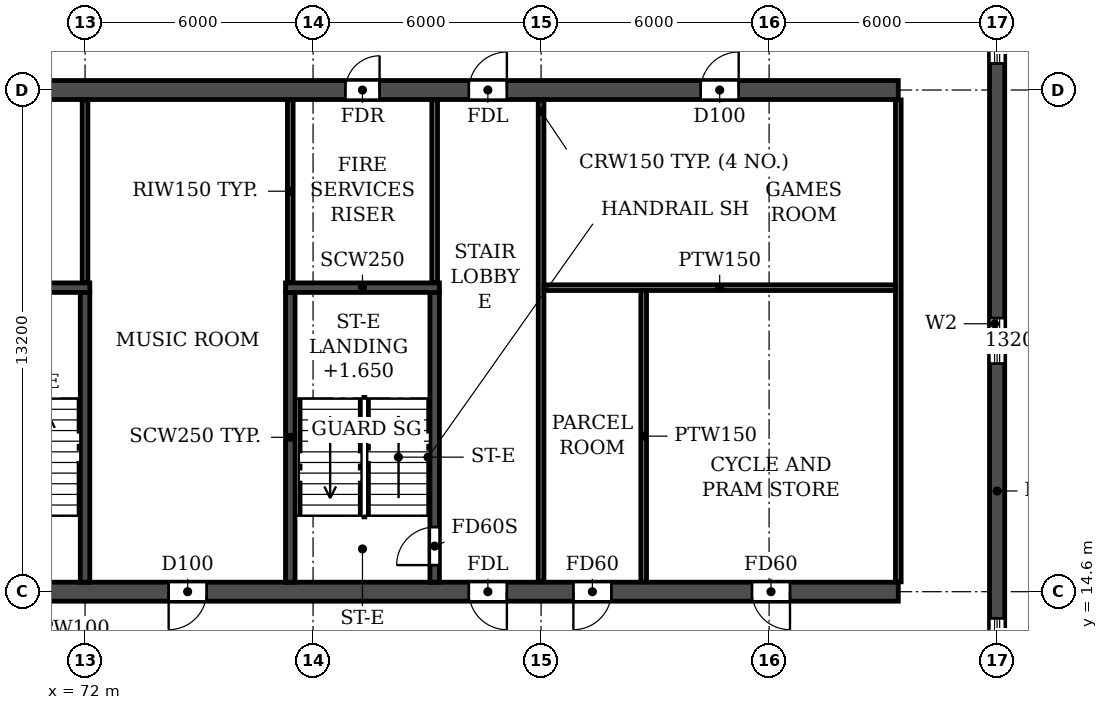
"""IFC4 building model, lengths in metres.
Left out: names, types, materials, properties, quantities, classifications, styles, units other than length and angle.
Written with IfcOpenShell. Run it as: python <this file> out.ifc"""

import sys

from ifc_helpers import new_model, si_unit, direction, frame, frame_2d, origin, place, context, subcontext, project, spatial, rectangle, extrude, element, fill, save


model = new_model("IFC4")
c1 = context("Model", 3, precision=1e-05, world=origin(), true_north=direction((0.0, 1.0)))
c2 = subcontext(c1, "Body", "Model", "MODEL_VIEW")
j1 = project(units=[si_unit("LENGTHUNIT", "METRE"), si_unit("PLANEANGLEUNIT", "RADIAN")], contexts=[c1])
p1 = place(None, origin())
s1 = spatial("IfcSite", under=j1, at=p1, CompositionType="ELEMENT")
p2 = place(p1, origin())
s2 = spatial("IfcBuilding", under=s1, at=p2, CompositionType="ELEMENT")
p3 = place(p2, frame((0.0, 0.0, 92.7)))
s3 = spatial("IfcBuildingStorey", under=s2, at=p3, CompositionType="ELEMENT", Elevation=92.7)
p4 = place(p3, frame((96.0, 4.683, 0.0), z_axis=(0.0, 0.0, 1.0), x_axis=(0.0, 1.0, 0.0)))
e1 = element("IfcWall", 1, at=p4, inside=s3, PredefinedType="SHEAR", context=c2, shape_type="SweptSolid", body=[
    extrude(rectangle(XDim=34.234, YDim=0.4, at=frame_2d((17.117, 0.0))), origin(), (0.0, 0.0, 1.0), 3.06),
])
p5 = place(p4, frame((15.917, 0.0, 0.9)))
e2 = element("IfcOpeningElement", 2, at=p5, cuts=e1, PredefinedType="OPENING", context=c2, shape_type="SweptSolid", body=[
    extrude(rectangle(XDim=1.2, YDim=1.5, at=frame_2d((0.6, 0.75))), frame((0.0, 0.21, 0.0), z_axis=(0.0, -1.0, 0.0), x_axis=(1.0, 0.0, 0.0)), (0.0, 0.0, 1.0), 0.42),
])
p6 = place(p4, frame((23.817, 0.0, 0.9)))
e3 = element("IfcOpeningElement", 3, at=p6, cuts=e1, PredefinedType="OPENING", context=c2, shape_type="SweptSolid", body=[
    extrude(rectangle(XDim=1.2, YDim=1.5, at=frame_2d((0.6, 0.75))), frame((0.0, 0.21, 0.0), z_axis=(0.0, -1.0, 0.0), x_axis=(1.0, 0.0, 0.0)), (0.0, 0.0, 1.0), 0.42),
])
p7 = place(p4, frame((8.017, 0.0, 0.9)))
e4 = element("IfcOpeningElement", 4, at=p7, cuts=e1, PredefinedType="OPENING", context=c2, shape_type="SweptSolid", body=[
    extrude(rectangle(XDim=1.2, YDim=1.5, at=frame_2d((0.6, 0.75))), frame((0.0, 0.21, 0.0), z_axis=(0.0, -1.0, 0.0), x_axis=(1.0, 0.0, 0.0)), (0.0, 0.0, 1.0), 0.42),
])
p8 = place(p4, frame((28.894, 0.0, 0.6)))
e5 = element("IfcOpeningElement", 5, at=p8, cuts=e1, PredefinedType="OPENING", context=c2, shape_type="SweptSolid", body=[
    extrude(rectangle(XDim=2.2, YDim=1.8, at=frame_2d((1.1, 0.9))), frame((0.0, 0.21, 0.0), z_axis=(0.0, -1.0, 0.0), x_axis=(1.0, 0.0, 0.0)), (0.0, 0.0, 1.0), 0.42),
])
p9 = place(p4, frame((2.541, 0.0, 0.6)))
e6 = element("IfcOpeningElement", 6, at=p9, cuts=e1, PredefinedType="OPENING", context=c2, shape_type="SweptSolid", body=[
    extrude(rectangle(XDim=2.2, YDim=1.8, at=frame_2d((1.1, 0.9))), frame((0.0, 0.21, 0.0), z_axis=(0.0, -1.0, 0.0), x_axis=(1.0, 0.0, 0.0)), (0.0, 0.0, 1.0), 0.42),
])
p10 = place(p3, frame((8.6, 14.6, 0.0), z_axis=(0.0, 0.0, 1.0), x_axis=(1.0, 0.0, 0.0)))
e7 = element("IfcWall", 7, at=p10, inside=s3, PredefinedType="SOLIDWALL", context=c2, shape_type="SweptSolid", body=[
    extrude(rectangle(XDim=84.8, YDim=0.5, at=frame_2d((42.4, 0.0))), origin(), (0.0, 0.0, 1.0), 3.06),
])
p11 = place(p10, frame((4.2, 0.0, 0.0)))
e8 = element("IfcOpeningElement", 8, at=p11, cuts=e7, PredefinedType="OPENING", context=c2, shape_type="SweptSolid", body=[
    extrude(rectangle(XDim=1.0, YDim=2.1, at=frame_2d((0.5, 1.05))), frame((0.0, 0.26, 0.0), z_axis=(0.0, -1.0, 0.0), x_axis=(1.0, 0.0, 0.0)), (0.0, 0.0, 1.0), 0.52),
])
p12 = place(p10, frame((10.3, 0.0, 0.0)))
e9 = element("IfcOpeningElement", 9, at=p12, cuts=e7, PredefinedType="OPENING", context=c2, shape_type="SweptSolid", body=[
    extrude(rectangle(XDim=1.0, YDim=2.1, at=frame_2d((0.5, 1.05))), frame((0.0, 0.26, 0.0), z_axis=(0.0, -1.0, 0.0), x_axis=(1.0, 0.0, 0.0)), (0.0, 0.0, 1.0), 0.52),
])
p13 = place(p10, frame((18.2, 0.0, 0.0)))
e10 = element("IfcOpeningElement", 10, at=p13, cuts=e7, PredefinedType="OPENING", context=c2, shape_type="SweptSolid", body=[
    extrude(rectangle(XDim=1.0, YDim=2.1, at=frame_2d((0.5, 1.05))), frame((0.0, 0.26, 0.0), z_axis=(0.0, -1.0, 0.0), x_axis=(1.0, 0.0, 0.0)), (0.0, 0.0, 1.0), 0.52),
])
p14 = place(p10, frame((22.8, 0.0, 0.0)))
e11 = element("IfcOpeningElement", 11, at=p14, cuts=e7, PredefinedType="OPENING", context=c2, shape_type="SweptSolid", body=[
    extrude(rectangle(XDim=1.0, YDim=2.1, at=frame_2d((0.5, 1.05))), frame((0.0, 0.26, 0.0), z_axis=(0.0, -1.0, 0.0), x_axis=(1.0, 0.0, 0.0)), (0.0, 0.0, 1.0), 0.52),
])
p15 = place(p10, frame((34.1, 0.0, 0.0)))
e12 = element("IfcOpeningElement", 12, at=p15, cuts=e7, PredefinedType="OPENING", context=c2, shape_type="SweptSolid", body=[
    extrude(rectangle(XDim=1.0, YDim=2.1, at=frame_2d((0.5, 1.05))), frame((0.0, 0.26, 0.0), z_axis=(0.0, -1.0, 0.0), x_axis=(1.0, 0.0, 0.0)), (0.0, 0.0, 1.0), 0.52),
])
p16 = place(p10, frame((38.0, 0.0, 0.0)))
e13 = element("IfcOpeningElement", 13, at=p16, cuts=e7, PredefinedType="OPENING", context=c2, shape_type="SweptSolid", body=[
    extrude(rectangle(XDim=1.0, YDim=2.1, at=frame_2d((0.5, 1.05))), frame((0.0, 0.26, 0.0), z_axis=(0.0, -1.0, 0.0), x_axis=(1.0, 0.0, 0.0)), (0.0, 0.0, 1.0), 0.52),
])
p17 = place(p10, frame((41.9, 0.0, 0.0)))
e14 = element("IfcOpeningElement", 14, at=p17, cuts=e7, PredefinedType="OPENING", context=c2, shape_type="SweptSolid", body=[
    extrude(rectangle(XDim=1.0, YDim=2.1, at=frame_2d((0.5, 1.05))), frame((0.0, 0.26, 0.0), z_axis=(0.0, -1.0, 0.0), x_axis=(1.0, 0.0, 0.0)), (0.0, 0.0, 1.0), 0.52),
])
p18 = place(p10, frame((47.1, 0.0, 0.0)))
e15 = element("IfcOpeningElement", 15, at=p18, cuts=e7, PredefinedType="OPENING", context=c2, shape_type="SweptSolid", body=[
    extrude(rectangle(XDim=1.0, YDim=2.1, at=frame_2d((0.5, 1.05))), frame((0.0, 0.26, 0.0), z_axis=(0.0, -1.0, 0.0), x_axis=(1.0, 0.0, 0.0)), (0.0, 0.0, 1.0), 0.52),
])
p19 = place(p10, frame((61.0, 0.0, 0.0)))
e16 = element("IfcOpeningElement", 16, at=p19, cuts=e7, PredefinedType="OPENING", context=c2, shape_type="SweptSolid", body=[
    extrude(rectangle(XDim=1.0, YDim=2.1, at=frame_2d((0.5, 1.05))), frame((0.0, 0.26, 0.0), z_axis=(0.0, -1.0, 0.0), x_axis=(1.0, 0.0, 0.0)), (0.0, 0.0, 1.0), 0.52),
])
p20 = place(p10, frame((65.6, 0.0, 0.0)))
e17 = element("IfcOpeningElement", 17, at=p20, cuts=e7, PredefinedType="OPENING", context=c2, shape_type="SweptSolid", body=[
    extrude(rectangle(XDim=1.0, YDim=2.1, at=frame_2d((0.5, 1.05))), frame((0.0, 0.26, 0.0), z_axis=(0.0, -1.0, 0.0), x_axis=(1.0, 0.0, 0.0)), (0.0, 0.0, 1.0), 0.52),
])
p21 = place(p10, frame((73.5, 0.0, 0.0)))
e18 = element("IfcOpeningElement", 18, at=p21, cuts=e7, PredefinedType="OPENING", context=c2, shape_type="SweptSolid", body=[
    extrude(rectangle(XDim=1.0, YDim=2.1, at=frame_2d((0.5, 1.05))), frame((0.0, 0.26, 0.0), z_axis=(0.0, -1.0, 0.0), x_axis=(1.0, 0.0, 0.0)), (0.0, 0.0, 1.0), 0.52),
])
p22 = place(p10, frame((76.25, 0.0, 0.0)))
e19 = element("IfcOpeningElement", 19, at=p22, cuts=e7, PredefinedType="OPENING", context=c2, shape_type="SweptSolid", body=[
    extrude(rectangle(XDim=1.0, YDim=2.1, at=frame_2d((0.5, 1.05))), frame((0.0, 0.26, 0.0), z_axis=(0.0, -1.0, 0.0), x_axis=(1.0, 0.0, 0.0)), (0.0, 0.0, 1.0), 0.52),
])
p23 = place(p10, frame((80.95, 0.0, 0.0)))
e20 = element("IfcOpeningElement", 20, at=p23, cuts=e7, PredefinedType="OPENING", context=c2, shape_type="SweptSolid", body=[
    extrude(rectangle(XDim=1.0, YDim=2.1, at=frame_2d((0.5, 1.05))), frame((0.0, 0.26, 0.0), z_axis=(0.0, -1.0, 0.0), x_axis=(1.0, 0.0, 0.0)), (0.0, 0.0, 1.0), 0.52),
])
p24 = place(p3, frame((8.6, 27.8, 0.0), z_axis=(0.0, 0.0, 1.0), x_axis=(1.0, 0.0, 0.0)))
e21 = element("IfcWall", 21, at=p24, inside=s3, PredefinedType="SOLIDWALL", context=c2, shape_type="SweptSolid", body=[
    extrude(rectangle(XDim=84.8, YDim=0.5, at=frame_2d((42.4, 0.0))), origin(), (0.0, 0.0, 1.0), 3.06),
])
p25 = place(p24, frame((0.9, 0.0, 0.0)))
e22 = element("IfcOpeningElement", 22, at=p25, cuts=e21, PredefinedType="OPENING", context=c2, shape_type="SweptSolid", body=[
    extrude(rectangle(XDim=1.0, YDim=2.1, at=frame_2d((0.5, 1.05))), frame((0.0, 0.26, 0.0), z_axis=(0.0, -1.0, 0.0), x_axis=(1.0, 0.0, 0.0)), (0.0, 0.0, 1.0), 0.52),
])
p26 = place(p24, frame((5.6, 0.0, 0.0)))
e23 = element("IfcOpeningElement", 23, at=p26, cuts=e21, PredefinedType="OPENING", context=c2, shape_type="SweptSolid", body=[
    extrude(rectangle(XDim=1.0, YDim=2.1, at=frame_2d((0.5, 1.05))), frame((0.0, 0.26, 0.0), z_axis=(0.0, -1.0, 0.0), x_axis=(1.0, 0.0, 0.0)), (0.0, 0.0, 1.0), 0.52),
])
p27 = place(p24, frame((10.3, 0.0, 0.0)))
e24 = element("IfcOpeningElement", 24, at=p27, cuts=e21, PredefinedType="OPENING", context=c2, shape_type="SweptSolid", body=[
    extrude(rectangle(XDim=1.0, YDim=2.1, at=frame_2d((0.5, 1.05))), frame((0.0, 0.26, 0.0), z_axis=(0.0, -1.0, 0.0), x_axis=(1.0, 0.0, 0.0)), (0.0, 0.0, 1.0), 0.52),
])
p28 = place(p24, frame((13.65, 0.0, 0.0)))
e25 = element("IfcOpeningElement", 25, at=p28, cuts=e21, PredefinedType="OPENING", context=c2, shape_type="SweptSolid", body=[
    extrude(rectangle(XDim=0.9, YDim=2.1, at=frame_2d((0.45, 1.05))), frame((0.0, 0.26, 0.0), z_axis=(0.0, -1.0, 0.0), x_axis=(1.0, 0.0, 0.0)), (0.0, 0.0, 1.0), 0.52),
])
p29 = place(p24, frame((22.85, 0.0, 0.0)))
e26 = element("IfcOpeningElement", 26, at=p29, cuts=e21, PredefinedType="OPENING", context=c2, shape_type="SweptSolid", body=[
    extrude(rectangle(XDim=0.9, YDim=2.1, at=frame_2d((0.45, 1.05))), frame((0.0, 0.26, 0.0), z_axis=(0.0, -1.0, 0.0), x_axis=(1.0, 0.0, 0.0)), (0.0, 0.0, 1.0), 0.52),
])
p30 = place(p24, frame((26.0, 0.0, 0.0)))
e27 = element("IfcOpeningElement", 27, at=p30, cuts=e21, PredefinedType="OPENING", context=c2, shape_type="SweptSolid", body=[
    extrude(rectangle(XDim=1.0, YDim=2.1, at=frame_2d((0.5, 1.05))), frame((0.0, 0.26, 0.0), z_axis=(0.0, -1.0, 0.0), x_axis=(1.0, 0.0, 0.0)), (0.0, 0.0, 1.0), 0.52),
])
p31 = place(p24, frame((31.2, 0.0, 0.0)))
e28 = element("IfcOpeningElement", 28, at=p31, cuts=e21, PredefinedType="OPENING", context=c2, shape_type="SweptSolid", body=[
    extrude(rectangle(XDim=1.0, YDim=2.1, at=frame_2d((0.5, 1.05))), frame((0.0, 0.26, 0.0), z_axis=(0.0, -1.0, 0.0), x_axis=(1.0, 0.0, 0.0)), (0.0, 0.0, 1.0), 0.52),
])
p32 = place(p24, frame((39.0, 0.0, 0.0)))
e29 = element("IfcOpeningElement", 29, at=p32, cuts=e21, PredefinedType="OPENING", context=c2, shape_type="SweptSolid", body=[
    extrude(rectangle(XDim=1.0, YDim=2.1, at=frame_2d((0.5, 1.05))), frame((0.0, 0.26, 0.0), z_axis=(0.0, -1.0, 0.0), x_axis=(1.0, 0.0, 0.0)), (0.0, 0.0, 1.0), 0.52),
])
p33 = place(p24, frame((41.9, 0.0, 0.0)))
e30 = element("IfcOpeningElement", 30, at=p33, cuts=e21, PredefinedType="OPENING", context=c2, shape_type="SweptSolid", body=[
    extrude(rectangle(XDim=1.0, YDim=2.1, at=frame_2d((0.5, 1.05))), frame((0.0, 0.26, 0.0), z_axis=(0.0, -1.0, 0.0), x_axis=(1.0, 0.0, 0.0)), (0.0, 0.0, 1.0), 0.52),
])
p34 = place(p24, frame((46.1, 0.0, 0.0)))
e31 = element("IfcOpeningElement", 31, at=p34, cuts=e21, PredefinedType="OPENING", context=c2, shape_type="SweptSolid", body=[
    extrude(rectangle(XDim=1.0, YDim=2.1, at=frame_2d((0.5, 1.05))), frame((0.0, 0.26, 0.0), z_axis=(0.0, -1.0, 0.0), x_axis=(1.0, 0.0, 0.0)), (0.0, 0.0, 1.0), 0.52),
])
p35 = place(p24, frame((50.0, 0.0, 0.0)))
e32 = element("IfcOpeningElement", 32, at=p35, cuts=e21, PredefinedType="OPENING", context=c2, shape_type="SweptSolid", body=[
    extrude(rectangle(XDim=1.0, YDim=2.1, at=frame_2d((0.5, 1.05))), frame((0.0, 0.26, 0.0), z_axis=(0.0, -1.0, 0.0), x_axis=(1.0, 0.0, 0.0)), (0.0, 0.0, 1.0), 0.52),
])
p36 = place(p24, frame((52.6, 0.0, 0.0)))
e33 = element("IfcOpeningElement", 33, at=p36, cuts=e21, PredefinedType="OPENING", context=c2, shape_type="SweptSolid", body=[
    extrude(rectangle(XDim=1.0, YDim=2.1, at=frame_2d((0.5, 1.05))), frame((0.0, 0.26, 0.0), z_axis=(0.0, -1.0, 0.0), x_axis=(1.0, 0.0, 0.0)), (0.0, 0.0, 1.0), 0.52),
])
p37 = place(p24, frame((56.25, 0.0, 0.0)))
e34 = element("IfcOpeningElement", 34, at=p37, cuts=e21, PredefinedType="OPENING", context=c2, shape_type="SweptSolid", body=[
    extrude(rectangle(XDim=1.5, YDim=2.1, at=frame_2d((0.75, 1.05))), frame((0.0, 0.26, 0.0), z_axis=(0.0, -1.0, 0.0), x_axis=(1.0, 0.0, 0.0)), (0.0, 0.0, 1.0), 0.52),
])
p38 = place(p24, frame((61.05, 0.0, 0.0)))
e35 = element("IfcOpeningElement", 35, at=p38, cuts=e21, PredefinedType="OPENING", context=c2, shape_type="SweptSolid", body=[
    extrude(rectangle(XDim=0.9, YDim=2.1, at=frame_2d((0.45, 1.05))), frame((0.0, 0.26, 0.0), z_axis=(0.0, -1.0, 0.0), x_axis=(1.0, 0.0, 0.0)), (0.0, 0.0, 1.0), 0.52),
])
p39 = place(p24, frame((70.25, 0.0, 0.0)))
e36 = element("IfcOpeningElement", 36, at=p39, cuts=e21, PredefinedType="OPENING", context=c2, shape_type="SweptSolid", body=[
    extrude(rectangle(XDim=0.9, YDim=2.1, at=frame_2d((0.45, 1.05))), frame((0.0, 0.26, 0.0), z_axis=(0.0, -1.0, 0.0), x_axis=(1.0, 0.0, 0.0)), (0.0, 0.0, 1.0), 0.52),
])
p40 = place(p24, frame((73.5, 0.0, 0.0)))
e37 = element("IfcOpeningElement", 37, at=p40, cuts=e21, PredefinedType="OPENING", context=c2, shape_type="SweptSolid", body=[
    extrude(rectangle(XDim=1.0, YDim=2.1, at=frame_2d((0.5, 1.05))), frame((0.0, 0.26, 0.0), z_axis=(0.0, -1.0, 0.0), x_axis=(1.0, 0.0, 0.0)), (0.0, 0.0, 1.0), 0.52),
])
p41 = place(p24, frame((79.6, 0.0, 0.0)))
e38 = element("IfcOpeningElement", 38, at=p41, cuts=e21, PredefinedType="OPENING", context=c2, shape_type="SweptSolid", body=[
    extrude(rectangle(XDim=1.0, YDim=2.1, at=frame_2d((0.5, 1.05))), frame((0.0, 0.26, 0.0), z_axis=(0.0, -1.0, 0.0), x_axis=(1.0, 0.0, 0.0)), (0.0, 0.0, 1.0), 0.52),
])
p42 = place(p3, frame((72.0, 14.85, 0.0), z_axis=(0.0, 0.0, 1.0), x_axis=(0.0, 1.0, 0.0)))
e39 = element("IfcWall", 39, at=p42, inside=s3, PredefinedType="SOLIDWALL", context=c2, shape_type="SweptSolid", body=[
    extrude(rectangle(XDim=7.625, YDim=0.25, at=frame_2d((3.812, 0.0))), origin(), (0.0, 0.0, 1.0), 3.06),
])
p43 = place(p3, frame((68.075, 22.6, 0.0), z_axis=(0.0, 0.0, 1.0), x_axis=(1.0, 0.0, 0.0)))
e40 = element("IfcWall", 40, at=p43, inside=s3, PredefinedType="SOLIDWALL", context=c2, shape_type="SweptSolid", body=[
    extrude(rectangle(XDim=4.05, YDim=0.25, at=frame_2d((2.025, 0.0))), origin(), (0.0, 0.0, 1.0), 3.06),
])
p44 = place(p3, frame((77.4, 14.85, 0.0), z_axis=(0.0, 0.0, 1.0), x_axis=(0.0, 1.0, 0.0)))
e41 = element("IfcWall", 41, at=p44, inside=s3, PredefinedType="SOLIDWALL", context=c2, shape_type="SweptSolid", body=[
    extrude(rectangle(XDim=7.625, YDim=0.25, at=frame_2d((3.812, 0.0))), origin(), (0.0, 0.0, 1.0), 3.06),
])
p45 = place(p3, frame((81.2, 14.85, 0.0), z_axis=(0.0, 0.0, 1.0), x_axis=(0.0, 1.0, 0.0)))
e42 = element("IfcWall", 42, at=p45, inside=s3, PredefinedType="SOLIDWALL", context=c2, shape_type="SweptSolid", body=[
    extrude(rectangle(XDim=7.625, YDim=0.25, at=frame_2d((3.812, 0.0))), origin(), (0.0, 0.0, 1.0), 3.06),
])
p46 = place(p45, frame((0.45, 0.0, 0.0)))
e43 = element("IfcOpeningElement", 43, at=p46, cuts=e42, PredefinedType="OPENING", context=c2, shape_type="SweptSolid", body=[
    extrude(rectangle(XDim=1.0, YDim=2.1, at=frame_2d((0.5, 1.05))), frame((0.0, 0.135, 0.0), z_axis=(0.0, -1.0, 0.0), x_axis=(1.0, 0.0, 0.0)), (0.0, 0.0, 1.0), 0.27),
])
p47 = place(p3, frame((77.275, 22.6, 0.0), z_axis=(0.0, 0.0, 1.0), x_axis=(1.0, 0.0, 0.0)))
e44 = element("IfcWall", 44, at=p47, inside=s3, PredefinedType="SOLIDWALL", context=c2, shape_type="SweptSolid", body=[
    extrude(rectangle(XDim=4.05, YDim=0.25, at=frame_2d((2.025, 0.0))), origin(), (0.0, 0.0, 1.0), 3.06),
])
for number, where, z_axis, x_axis in (
    (45, (84.0, 14.86, 0.0), (0.0, 0.0, 1.0), (0.0, 1.0, 0.0)),
    (46, (93.4, 14.86, 0.0), (0.0, 0.0, 1.0), (0.0, 1.0, 0.0)),
):
    element("IfcWall", number, at=place(p3, frame(where, z_axis=z_axis, x_axis=x_axis)), inside=s3, PredefinedType="PARTITIONING", context=c2, shape_type="SweptSolid", body=[
        extrude(rectangle(XDim=12.68, YDim=0.15, at=frame_2d((6.34, 0.0))), origin(), (0.0, 0.0, 1.0), 3.06),
    ])
p48 = place(p3, frame((84.075, 22.6, 0.0), z_axis=(0.0, 0.0, 1.0), x_axis=(1.0, 0.0, 0.0)))
e47 = element("IfcWall", 47, at=p48, inside=s3, PredefinedType="PARTITIONING", context=c2, shape_type="SweptSolid", body=[
    extrude(rectangle(XDim=9.25, YDim=0.15, at=frame_2d((4.625, 0.0))), origin(), (0.0, 0.0, 1.0), 3.06),
])
p49 = place(p3, frame((86.7, 14.86, 0.0), z_axis=(0.0, 0.0, 1.0), x_axis=(0.0, 1.0, 0.0)))
e48 = element("IfcWall", 48, at=p49, inside=s3, PredefinedType="PARTITIONING", context=c2, shape_type="SweptSolid", body=[
    extrude(rectangle(XDim=7.665, YDim=0.15, at=frame_2d((3.833, 0.0))), origin(), (0.0, 0.0, 1.0), 3.06),
])
for number, where, z_axis, x_axis in (
    (49, (72.0, 22.735, 0.0), (0.0, 0.0, 1.0), (0.0, 1.0, 0.0)),
    (50, (77.4, 22.735, 0.0), (0.0, 0.0, 1.0), (0.0, 1.0, 0.0)),
    (51, (81.2, 22.735, 0.0), (0.0, 0.0, 1.0), (0.0, 1.0, 0.0)),
):
    element("IfcWall", number, at=place(p3, frame(where, z_axis=z_axis, x_axis=x_axis)), inside=s3, PredefinedType="PARTITIONING", context=c2, shape_type="SweptSolid", body=[
        extrude(rectangle(XDim=4.805, YDim=0.15, at=frame_2d((2.402, 0.0))), origin(), (0.0, 0.0, 1.0), 3.06),
    ])
p50 = place(p5, origin())
e52 = element("IfcWindow", 52, at=p50, inside=s3, PartitioningType="SINGLE_PANEL", PredefinedType="WINDOW", context=c2, shape_type="SweptSolid", body=[
    extrude(rectangle(XDim=1.2, YDim=1.5, at=frame_2d((0.6, 0.75))), frame((0.0, 0.03, 0.0), z_axis=(0.0, -1.0, 0.0), x_axis=(1.0, 0.0, 0.0)), (0.0, 0.0, 1.0), 0.06),
])
fill(e2, e52)
p51 = place(p6, origin())
e53 = element("IfcWindow", 53, at=p51, inside=s3, PartitioningType="SINGLE_PANEL", PredefinedType="WINDOW", context=c2, shape_type="SweptSolid", body=[
    extrude(rectangle(XDim=1.2, YDim=1.5, at=frame_2d((0.6, 0.75))), frame((0.0, 0.03, 0.0), z_axis=(0.0, -1.0, 0.0), x_axis=(1.0, 0.0, 0.0)), (0.0, 0.0, 1.0), 0.06),
])
fill(e3, e53)
p52 = place(p7, origin())
e54 = element("IfcWindow", 54, at=p52, inside=s3, PartitioningType="SINGLE_PANEL", PredefinedType="WINDOW", context=c2, shape_type="SweptSolid", body=[
    extrude(rectangle(XDim=1.2, YDim=1.5, at=frame_2d((0.6, 0.75))), frame((0.0, 0.03, 0.0), z_axis=(0.0, -1.0, 0.0), x_axis=(1.0, 0.0, 0.0)), (0.0, 0.0, 1.0), 0.06),
])
fill(e4, e54)
p53 = place(p39, origin())
e55 = element("IfcDoor", 55, at=p53, inside=s3, OperationType="SINGLE_SWING_RIGHT", PredefinedType="DOOR", context=c2, shape_type="SweptSolid", body=[
    extrude(rectangle(XDim=0.9, YDim=2.1, at=frame_2d((0.45, 1.05))), frame((0.0, 0.025, 0.0), z_axis=(0.0, -1.0, 0.0), x_axis=(1.0, 0.0, 0.0)), (0.0, 0.0, 1.0), 0.05),
])
fill(e36, e55)
p54 = place(p40, origin())
e56 = element("IfcDoor", 56, at=p54, inside=s3, OperationType="SINGLE_SWING_RIGHT", PredefinedType="DOOR", context=c2, shape_type="SweptSolid", body=[
    extrude(rectangle(XDim=1.0, YDim=2.1, at=frame_2d((0.5, 1.05))), frame((0.0, 0.025, 0.0), z_axis=(0.0, -1.0, 0.0), x_axis=(1.0, 0.0, 0.0)), (0.0, 0.0, 1.0), 0.05),
])
fill(e37, e56)
p55 = place(p41, origin())
e57 = element("IfcDoor", 57, at=p55, inside=s3, OperationType="SINGLE_SWING_RIGHT", PredefinedType="DOOR", context=c2, shape_type="SweptSolid", body=[
    extrude(rectangle(XDim=1.0, YDim=2.1, at=frame_2d((0.5, 1.05))), frame((0.0, 0.025, 0.0), z_axis=(0.0, -1.0, 0.0), x_axis=(1.0, 0.0, 0.0)), (0.0, 0.0, 1.0), 0.05),
])
fill(e38, e57)
p56 = place(p20, frame((1.0, 0.0, 0.0), z_axis=(0.0, 0.0, 1.0), x_axis=(-1.0, 0.0, 0.0)))
e58 = element("IfcDoor", 58, at=p56, inside=s3, OperationType="SINGLE_SWING_RIGHT", PredefinedType="DOOR", context=c2, shape_type="SweptSolid", body=[
    extrude(rectangle(XDim=1.0, YDim=2.1, at=frame_2d((0.5, 1.05))), frame((0.0, 0.025, 0.0), z_axis=(0.0, -1.0, 0.0), x_axis=(1.0, 0.0, 0.0)), (0.0, 0.0, 1.0), 0.05),
])
fill(e17, e58)
p57 = place(p21, frame((1.0, 0.0, 0.0), z_axis=(0.0, 0.0, 1.0), x_axis=(-1.0, 0.0, 0.0)))
e59 = element("IfcDoor", 59, at=p57, inside=s3, OperationType="SINGLE_SWING_LEFT", PredefinedType="DOOR", context=c2, shape_type="SweptSolid", body=[
    extrude(rectangle(XDim=1.0, YDim=2.1, at=frame_2d((0.5, 1.05))), frame((0.0, 0.025, 0.0), z_axis=(0.0, -1.0, 0.0), x_axis=(1.0, 0.0, 0.0)), (0.0, 0.0, 1.0), 0.05),
])
fill(e18, e59)
p58 = place(p22, frame((1.0, 0.0, 0.0), z_axis=(0.0, 0.0, 1.0), x_axis=(-1.0, 0.0, 0.0)))
e60 = element("IfcDoor", 60, at=p58, inside=s3, OperationType="SINGLE_SWING_RIGHT", PredefinedType="DOOR", context=c2, shape_type="SweptSolid", body=[
    extrude(rectangle(XDim=1.0, YDim=2.1, at=frame_2d((0.5, 1.05))), frame((0.0, 0.025, 0.0), z_axis=(0.0, -1.0, 0.0), x_axis=(1.0, 0.0, 0.0)), (0.0, 0.0, 1.0), 0.05),
])
fill(e19, e60)
p59 = place(p23, frame((1.0, 0.0, 0.0), z_axis=(0.0, 0.0, 1.0), x_axis=(-1.0, 0.0, 0.0)))
e61 = element("IfcDoor", 61, at=p59, inside=s3, OperationType="SINGLE_SWING_LEFT", PredefinedType="DOOR", context=c2, shape_type="SweptSolid", body=[
    extrude(rectangle(XDim=1.0, YDim=2.1, at=frame_2d((0.5, 1.05))), frame((0.0, 0.025, 0.0), z_axis=(0.0, -1.0, 0.0), x_axis=(1.0, 0.0, 0.0)), (0.0, 0.0, 1.0), 0.05),
])
fill(e20, e61)
p60 = place(p46, origin())
e62 = element("IfcDoor", 62, at=p60, inside=s3, OperationType="SINGLE_SWING_LEFT", PredefinedType="DOOR", context=c2, shape_type="SweptSolid", body=[
    extrude(rectangle(XDim=1.0, YDim=2.1, at=frame_2d((0.5, 1.05))), frame((0.0, 0.025, 0.0), z_axis=(0.0, -1.0, 0.0), x_axis=(1.0, 0.0, 0.0)), (0.0, 0.0, 1.0), 0.05),
])
fill(e43, e62)
save(model, sys.argv[1])
